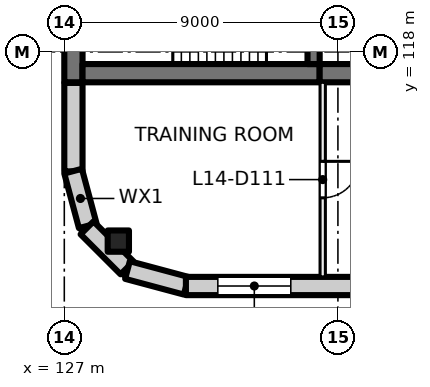
"""IFC4 building model, lengths in metres.
Left out: names, types, materials, properties, quantities, classifications, styles, units other than length and angle.
Written with IfcOpenShell. Run it as: python <this file> out.ifc"""

import sys

from ifc_helpers import new_model, si_unit, direction, frame, frame_2d, origin, origin_2d, place, context, subcontext, project, spatial, rectangle, extrude, element, fill, save


model = new_model("IFC4")
c1 = context("Model", 3, precision=1e-05, world=origin(), true_north=direction((0.0, 1.0)))
c2 = subcontext(c1, "Body", "Model", "MODEL_VIEW")
j1 = project(units=[si_unit("LENGTHUNIT", "METRE"), si_unit("PLANEANGLEUNIT", "RADIAN")], contexts=[c1])
p1 = place(None, origin())
s1 = spatial("IfcSite", under=j1, at=p1, CompositionType="ELEMENT")
p2 = place(p1, origin())
s2 = spatial("IfcBuilding", under=s1, at=p2, CompositionType="ELEMENT")
p3 = place(p2, frame((0.0, 0.0, 63.5)))
s3 = spatial("IfcBuildingStorey", under=s2, at=p3, CompositionType="ELEMENT", Elevation=63.5)
p4 = place(p3, frame((128.777, 111.777, 0.0), z_axis=(0.0, 0.0, 1.0), x_axis=(1.0, 0.0, 0.0)))
e1 = element("IfcColumn", 1, at=p4, inside=s3, PredefinedType="COLUMN", context=c2, shape_type="SweptSolid", body=[
    extrude(rectangle(XDim=0.7, YDim=0.7, at=origin_2d()), origin(), (0.0, 0.0, 1.0), 4.0),
])
p5 = place(p3, frame((127.3, 117.0, 0.0), z_axis=(0.0, 0.0, 1.0), x_axis=(0.0, 1.0, 0.0)))
e2 = element("IfcWall", 2, at=p5, inside=s3, PredefinedType="SHEAR", context=c2, shape_type="SweptSolid", body=[
    extrude(rectangle(XDim=3.8, YDim=0.6, at=frame_2d((1.9, 0.0))), origin(), (0.0, 0.0, 1.0), 4.0),
])
p6 = place(p3, frame((127.6, 117.3, 0.0), z_axis=(0.0, 0.0, 1.0), x_axis=(1.0, 0.0, 0.0)))
e3 = element("IfcWall", 3, at=p6, inside=s3, PredefinedType="SHEAR", context=c2, shape_type="SweptSolid", body=[
    extrude(rectangle(XDim=7.8, YDim=0.6, at=frame_2d((3.9, 0.0))), origin(), (0.0, 0.0, 1.0), 4.0),
])
p7 = place(p3, frame((135.4, 117.3, 0.0), z_axis=(0.0, 0.0, 1.0), x_axis=(1.0, 0.0, 0.0)))
e4 = element("IfcWall", 4, at=p7, inside=s3, PredefinedType="SHEAR", context=c2, shape_type="SweptSolid", body=[
    extrude(rectangle(XDim=4.6, YDim=0.6, at=frame_2d((2.3, 0.0))), origin(), (0.0, 0.0, 1.0), 4.0),
])
p8 = place(p3, frame((135.2, 117.6, 0.0), z_axis=(0.0, 0.0, 1.0), x_axis=(0.0, 1.0, 0.0)))
e5 = element("IfcWall", 5, at=p8, inside=s3, PredefinedType="SHEAR", context=c2, shape_type="SweptSolid", body=[
    extrude(rectangle(XDim=2.8, YDim=0.4, at=frame_2d((1.4, 0.0))), origin(), (0.0, 0.0, 1.0), 4.0),
])
p9 = place(p8, frame((0.9, 0.0, 0.0)))
e6 = element("IfcOpeningElement", 6, at=p9, cuts=e5, PredefinedType="OPENING", context=c2, shape_type="SweptSolid", body=[
    extrude(rectangle(XDim=1.0, YDim=2.1, at=frame_2d((0.5, 1.05))), frame((0.0, 0.21, 0.0), z_axis=(0.0, -1.0, 0.0), x_axis=(1.0, 0.0, 0.0)), (0.0, 0.0, 1.0), 0.42),
])
p10 = place(p3, frame((127.3, 114.07, 0.0), z_axis=(0.0, 0.0, 1.0), x_axis=(0.0, 1.0, 0.0)))
e7 = element("IfcWall", 7, at=p10, inside=s3, PredefinedType="SOLIDWALL", context=c2, shape_type="SweptSolid", body=[
    extrude(rectangle(XDim=2.91, YDim=0.6, at=frame_2d((1.455, 0.0))), origin(), (0.0, 0.0, 1.0), 3.625),
])
for number, where, z_axis, x_axis in (
    (8, (127.771, 112.281, 0.0), (0.0, 0.0, 1.0), (-0.259, 0.966, 0.0)),
    (9, (129.064, 110.896, 0.0), (0.0, 0.0, 1.0), (-0.707, 0.707, 0.0)),
):
    element("IfcWall", number, at=place(p3, frame(where, z_axis=z_axis, x_axis=x_axis)), inside=s3, PredefinedType="SOLIDWALL", context=c2, shape_type="SweptSolid", body=[
        extrude(rectangle(XDim=1.861, YDim=0.6, at=frame_2d((0.93, 0.0))), origin(), (0.0, 0.0, 1.0), 3.625),
    ])
p11 = place(p3, frame((131.01, 110.308, 0.0), z_axis=(0.0, 0.0, 1.0), x_axis=(-0.965920269068, 0.258839784042, 0.0)))
e10 = element("IfcWall", 10, at=p11, inside=s3, PredefinedType="SOLIDWALL", context=c2, shape_type="SweptSolid", body=[
    extrude(rectangle(XDim=2.0, YDim=0.6, at=frame_2d((1.0, 0.0))), origin(), (0.0, 0.0, 1.0), 3.625),
])
p12 = place(p3, frame((162.93, 110.3, 0.0), z_axis=(0.0, 0.0, 1.0), x_axis=(-1.0, 0.0, 0.0)))
e11 = element("IfcWall", 11, at=p12, inside=s3, PredefinedType="SOLIDWALL", context=c2, shape_type="SweptSolid", body=[
    extrude(rectangle(XDim=31.93, YDim=0.6, at=frame_2d((15.965, 0.0))), origin(), (0.0, 0.0, 1.0), 3.625),
])
p13 = place(p12, frame((1.48, 0.0, 0.9)))
e12 = element("IfcOpeningElement", 12, at=p13, cuts=e11, PredefinedType="OPENING", context=c2, shape_type="SweptSolid", body=[
    extrude(rectangle(XDim=2.4, YDim=2.4, at=frame_2d((1.2, 1.2))), frame((0.0, 0.31, 0.0), z_axis=(0.0, -1.0, 0.0), x_axis=(1.0, 0.0, 0.0)), (0.0, 0.0, 1.0), 0.62),
])
p14 = place(p12, frame((5.98, 0.0, 0.9)))
e13 = element("IfcOpeningElement", 13, at=p14, cuts=e11, PredefinedType="OPENING", context=c2, shape_type="SweptSolid", body=[
    extrude(rectangle(XDim=2.4, YDim=2.4, at=frame_2d((1.2, 1.2))), frame((0.0, 0.31, 0.0), z_axis=(0.0, -1.0, 0.0), x_axis=(1.0, 0.0, 0.0)), (0.0, 0.0, 1.0), 0.62),
])
p15 = place(p12, frame((10.48, 0.0, 0.9)))
e14 = element("IfcOpeningElement", 14, at=p15, cuts=e11, PredefinedType="OPENING", context=c2, shape_type="SweptSolid", body=[
    extrude(rectangle(XDim=2.4, YDim=2.4, at=frame_2d((1.2, 1.2))), frame((0.0, 0.31, 0.0), z_axis=(0.0, -1.0, 0.0), x_axis=(1.0, 0.0, 0.0)), (0.0, 0.0, 1.0), 0.62),
])
p16 = place(p12, frame((14.98, 0.0, 0.9)))
e15 = element("IfcOpeningElement", 15, at=p16, cuts=e11, PredefinedType="OPENING", context=c2, shape_type="SweptSolid", body=[
    extrude(rectangle(XDim=2.4, YDim=2.4, at=frame_2d((1.2, 1.2))), frame((0.0, 0.31, 0.0), z_axis=(0.0, -1.0, 0.0), x_axis=(1.0, 0.0, 0.0)), (0.0, 0.0, 1.0), 0.62),
])
p17 = place(p12, frame((19.48, 0.0, 0.9)))
e16 = element("IfcOpeningElement", 16, at=p17, cuts=e11, PredefinedType="OPENING", context=c2, shape_type="SweptSolid", body=[
    extrude(rectangle(XDim=2.4, YDim=2.4, at=frame_2d((1.2, 1.2))), frame((0.0, 0.31, 0.0), z_axis=(0.0, -1.0, 0.0), x_axis=(1.0, 0.0, 0.0)), (0.0, 0.0, 1.0), 0.62),
])
p18 = place(p12, frame((23.98, 0.0, 0.9)))
e17 = element("IfcOpeningElement", 17, at=p18, cuts=e11, PredefinedType="OPENING", context=c2, shape_type="SweptSolid", body=[
    extrude(rectangle(XDim=2.4, YDim=2.4, at=frame_2d((1.2, 1.2))), frame((0.0, 0.31, 0.0), z_axis=(0.0, -1.0, 0.0), x_axis=(1.0, 0.0, 0.0)), (0.0, 0.0, 1.0), 0.62),
])
p19 = place(p12, frame((28.48, 0.0, 0.9)))
e18 = element("IfcOpeningElement", 18, at=p19, cuts=e11, PredefinedType="OPENING", context=c2, shape_type="SweptSolid", body=[
    extrude(rectangle(XDim=2.4, YDim=2.4, at=frame_2d((1.2, 1.2))), frame((0.0, 0.31, 0.0), z_axis=(0.0, -1.0, 0.0), x_axis=(1.0, 0.0, 0.0)), (0.0, 0.0, 1.0), 0.62),
])
p20 = place(p3, frame((135.5, 117.0, 0.0), z_axis=(0.0, 0.0, 1.0), x_axis=(0.0, -1.0, 0.0)))
e19 = element("IfcWall", 19, at=p20, inside=s3, PredefinedType="PARTITIONING", context=c2, shape_type="SweptSolid", body=[
    extrude(rectangle(XDim=6.4, YDim=0.175, at=frame_2d((3.2, 0.0))), origin(), (0.0, 0.0, 1.0), 3.625),
])
p21 = place(p20, frame((2.6, 0.0, 0.0)))
e20 = element("IfcOpeningElement", 20, at=p21, cuts=e19, PredefinedType="OPENING", context=c2, shape_type="SweptSolid", body=[
    extrude(rectangle(XDim=1.2, YDim=2.1, at=frame_2d((0.6, 1.05))), frame((0.0, 0.097, 0.0), z_axis=(0.0, -1.0, 0.0), x_axis=(1.0, 0.0, 0.0)), (0.0, 0.0, 1.0), 0.195),
])
p22 = place(p19, origin())
e21 = element("IfcWindow", 21, at=p22, inside=s3, PartitioningType="SINGLE_PANEL", PredefinedType="WINDOW", context=c2, shape_type="SweptSolid", body=[
    extrude(rectangle(XDim=2.4, YDim=2.4, at=frame_2d((1.2, 1.2))), frame((0.0, 0.03, 0.0), z_axis=(0.0, -1.0, 0.0), x_axis=(1.0, 0.0, 0.0)), (0.0, 0.0, 1.0), 0.06),
])
fill(e18, e21)
p23 = place(p21, origin())
e22 = element("IfcDoor", 22, at=p23, inside=s3, OperationType="DOUBLE_DOOR_SINGLE_SWING", PredefinedType="DOOR", context=c2, shape_type="SweptSolid", body=[
    extrude(rectangle(XDim=1.2, YDim=2.1, at=frame_2d((0.6, 1.05))), frame((0.0, 0.025, 0.0), z_axis=(0.0, -1.0, 0.0), x_axis=(1.0, 0.0, 0.0)), (0.0, 0.0, 1.0), 0.05),
])
fill(e20, e22)
save(model, sys.argv[1])
